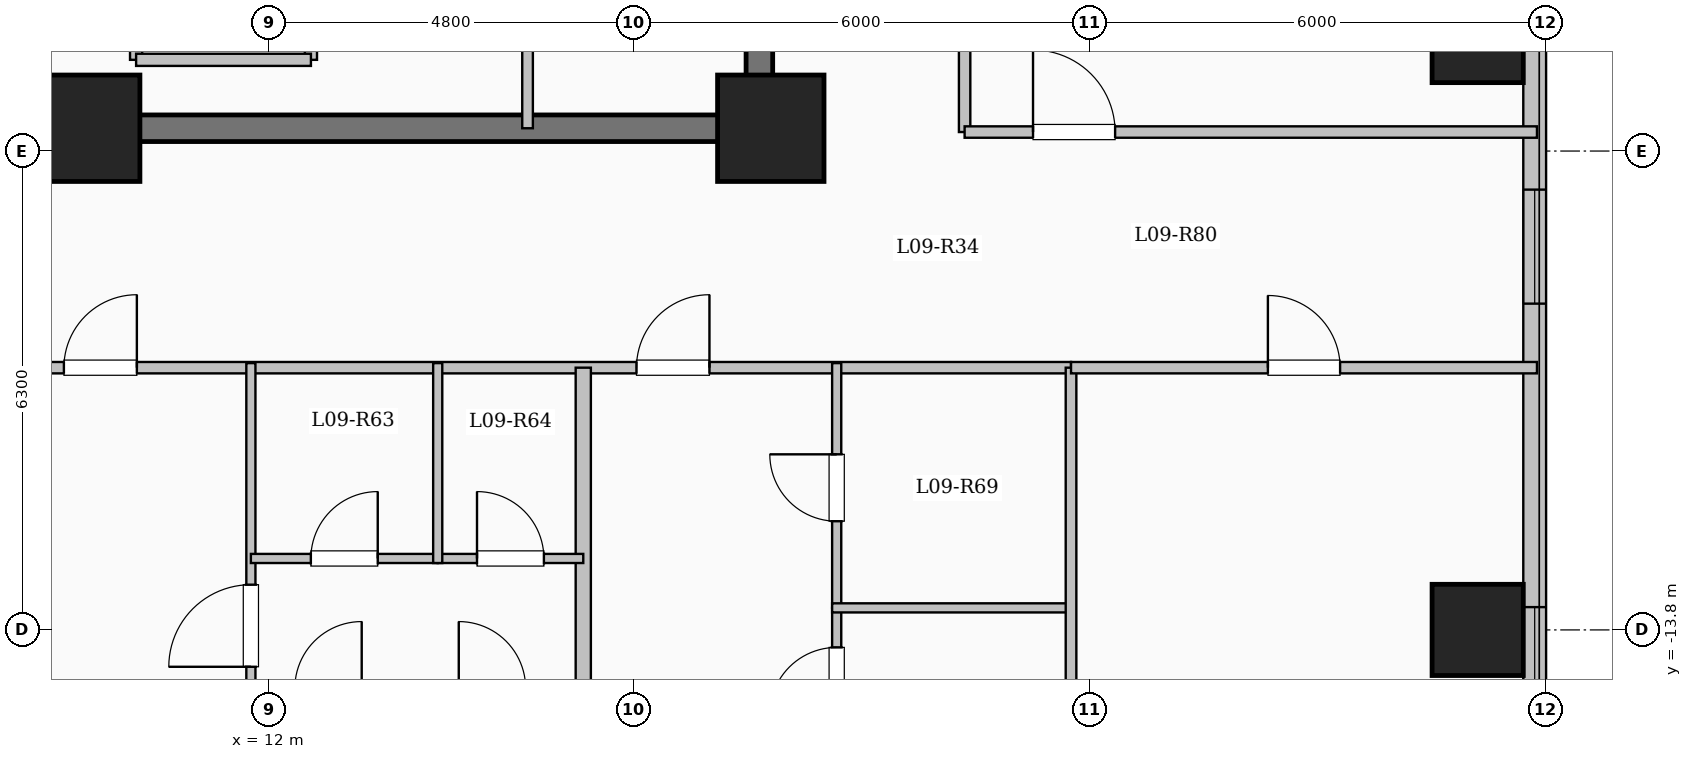
"""IFC4 building model, lengths in metres.
Left out: names, types, materials, properties, quantities, classifications, styles, units other than length and angle.
Written with IfcOpenShell. Run it as: python <this file> out.ifc"""

import sys

from ifc_helpers import new_model, si_unit, direction, frame, frame_2d, origin, origin_2d, place, context, subcontext, project, spatial, rectangle, extrude, element, fill, save


model = new_model("IFC4")
c1 = context("Model", 3, precision=1e-05, world=origin(), true_north=direction((0.0, 1.0)))
c2 = subcontext(c1, "Body", "Model", "MODEL_VIEW")
j1 = project(units=[si_unit("LENGTHUNIT", "METRE"), si_unit("PLANEANGLEUNIT", "RADIAN")], contexts=[c1])
p1 = place(None, origin())
s1 = spatial("IfcSite", under=j1, at=p1, CompositionType="ELEMENT")
p2 = place(p1, origin())
s2 = spatial("IfcBuilding", under=s1, at=p2, CompositionType="ELEMENT")
p3 = place(p2, frame((0.0, 0.0, 37.4)))
s3 = spatial("IfcBuildingStorey", under=s2, at=p3, CompositionType="ELEMENT", Elevation=37.4)
for number, where, z_axis, x_axis in (
    (1, (9.6, -7.2, 0.0), (0.0, 0.0, 1.0), (1.0, 0.0, 0.0)),
    (2, (18.6, -7.2, 0.0), (0.0, 0.0, 1.0), (1.0, 0.0, 0.0)),
):
    element("IfcColumn", number, at=place(p3, frame(where, z_axis=z_axis, x_axis=x_axis)), inside=s3, PredefinedType="COLUMN", context=c2, shape_type="SweptSolid", body=[
        extrude(rectangle(XDim=1.4, YDim=1.4, at=origin_2d()), origin(), (0.0, 0.0, 1.0), 3.35),
    ])
for number, where, z_axis, x_axis in (
    (3, (27.9, -13.8, 0.0), (0.0, 0.0, 1.0), (1.0, 0.0, 0.0)),
    (4, (27.9, -6.0, 0.0), (0.0, 0.0, 1.0), (1.0, 0.0, 0.0)),
):
    element("IfcColumn", number, at=place(p3, frame(where, z_axis=z_axis, x_axis=x_axis)), inside=s3, PredefinedType="COLUMN", context=c2, shape_type="SweptSolid", body=[
        extrude(rectangle(XDim=1.2, YDim=1.2, at=origin_2d()), origin(), (0.0, 0.0, 1.0), 3.35),
    ])
p4 = place(p3, frame((28.65, 19.05, 0.0), z_axis=(0.0, 0.0, 1.0), x_axis=(0.0, -1.0, 0.0)))
e5 = element("IfcWall", 5, at=p4, inside=s3, PredefinedType="SOLIDWALL", context=c2, shape_type="SweptSolid", body=[
    extrude(rectangle(XDim=38.1, YDim=0.3, at=frame_2d((19.05, 0.0))), origin(), (0.0, 0.0, 1.0), 3.1),
])
p5 = place(p4, frame((2.275, 0.0, 0.9)))
e6 = element("IfcOpeningElement", 6, at=p5, cuts=e5, PredefinedType="OPENING", context=c2, shape_type="SweptSolid", body=[
    extrude(rectangle(XDim=2.0, YDim=1.7, at=frame_2d((1.0, 0.85))), frame((0.0, 0.16, 0.0), z_axis=(0.0, -1.0, 0.0), x_axis=(1.0, 0.0, 0.0)), (0.0, 0.0, 1.0), 0.32),
])
p6 = place(p4, frame((6.925, 0.0, 0.95)))
e7 = element("IfcOpeningElement", 7, at=p6, cuts=e5, PredefinedType="OPENING", context=c2, shape_type="SweptSolid", body=[
    extrude(rectangle(XDim=1.0, YDim=1.5, at=frame_2d((0.5, 0.75))), frame((0.0, 0.16, 0.0), z_axis=(0.0, -1.0, 0.0), x_axis=(1.0, 0.0, 0.0)), (0.0, 0.0, 1.0), 0.32),
])
p7 = place(p4, frame((16.3, 0.0, 0.9)))
e8 = element("IfcOpeningElement", 8, at=p7, cuts=e5, PredefinedType="OPENING", context=c2, shape_type="SweptSolid", body=[
    extrude(rectangle(XDim=2.0, YDim=1.7, at=frame_2d((1.0, 0.85))), frame((0.0, 0.16, 0.0), z_axis=(0.0, -1.0, 0.0), x_axis=(1.0, 0.0, 0.0)), (0.0, 0.0, 1.0), 0.32),
])
p8 = place(p4, frame((27.058, 0.0, 0.9)))
e9 = element("IfcOpeningElement", 9, at=p8, cuts=e5, PredefinedType="OPENING", context=c2, shape_type="SweptSolid", body=[
    extrude(rectangle(XDim=1.5, YDim=1.65, at=frame_2d((0.75, 0.825))), frame((0.0, 0.16, 0.0), z_axis=(0.0, -1.0, 0.0), x_axis=(1.0, 0.0, 0.0)), (0.0, 0.0, 1.0), 0.32),
])
p9 = place(p4, frame((32.55, 0.0, 0.9)))
e10 = element("IfcOpeningElement", 10, at=p9, cuts=e5, PredefinedType="OPENING", context=c2, shape_type="SweptSolid", body=[
    extrude(rectangle(XDim=2.4, YDim=1.8, at=frame_2d((1.2, 0.9))), frame((0.0, 0.16, 0.0), z_axis=(0.0, -1.0, 0.0), x_axis=(1.0, 0.0, 0.0)), (0.0, 0.0, 1.0), 0.32),
])
for number, where, z_axis, x_axis in (
    (11, (10.25, -6.3, 0.0), (0.0, 0.0, 1.0), (0.0, 1.0, 0.0)),
    (12, (12.55, -6.3, 0.0), (0.0, 0.0, 1.0), (0.0, 1.0, 0.0)),
):
    element("IfcWall", number, at=place(p3, frame(where, z_axis=z_axis, x_axis=x_axis)), inside=s3, PredefinedType="SOLIDWALL", context=c2, shape_type="SweptSolid", body=[
        extrude(rectangle(XDim=2.6, YDim=0.16, at=frame_2d((1.3, 0.0))), origin(), (0.0, 0.0, 1.0), 3.1),
    ])
p10 = place(p3, frame((10.25, -6.3, 0.0), z_axis=(0.0, 0.0, 1.0), x_axis=(1.0, 0.0, 0.0)))
e13 = element("IfcWall", 13, at=p10, inside=s3, PredefinedType="SOLIDWALL", context=c2, shape_type="SweptSolid", body=[
    extrude(rectangle(XDim=2.3, YDim=0.16, at=frame_2d((1.15, 0.0))), origin(), (0.0, 0.0, 1.0), 3.1),
])
p11 = place(p3, frame((18.45, -7.375, 0.0), z_axis=(0.0, 0.0, 1.0), x_axis=(0.0, 1.0, 0.0)))
e14 = element("IfcWall", 14, at=p11, inside=s3, PredefinedType="SHEAR", context=c2, shape_type="SweptSolid", body=[
    extrude(rectangle(XDim=14.05, YDim=0.35, at=frame_2d((7.025, 0.0))), origin(), (0.0, 0.0, 1.0), 3.35),
])
p12 = place(p3, frame((10.075, -7.2, 0.0), z_axis=(0.0, 0.0, 1.0), x_axis=(1.0, 0.0, 0.0)))
e15 = element("IfcWall", 15, at=p12, inside=s3, PredefinedType="SHEAR", context=c2, shape_type="SweptSolid", body=[
    extrude(rectangle(XDim=8.55, YDim=0.35, at=frame_2d((4.275, 0.0))), origin(), (0.0, 0.0, 1.0), 3.35),
])
p13 = place(p3, frame((15.4, -7.2, 0.0), z_axis=(0.0, 0.0, 1.0), x_axis=(0.0, 1.0, 0.0)))
e16 = element("IfcWall", 16, at=p13, inside=s3, PredefinedType="PARTITIONING", context=c2, shape_type="SweptSolid", body=[
    extrude(rectangle(XDim=10.45, YDim=0.14, at=frame_2d((5.225, 0.0))), origin(), (0.0, 0.0, 1.0), 3.1),
])
p14 = place(p13, frame((9.25, 0.0, 0.0)))
e17 = element("IfcOpeningElement", 17, at=p14, cuts=e16, PredefinedType="OPENING", context=c2, shape_type="SweptSolid", body=[
    extrude(rectangle(XDim=0.9, YDim=2.08, at=frame_2d((0.45, 1.04))), frame((0.0, 0.08, 0.0), z_axis=(0.0, -1.0, 0.0), x_axis=(1.0, 0.0, 0.0)), (0.0, 0.0, 1.0), 0.16),
])
p15 = place(p3, frame((21.15, -7.25, 0.0), z_axis=(0.0, 0.0, 1.0), x_axis=(0.0, 1.0, 0.0)))
e18 = element("IfcWall", 18, at=p15, inside=s3, PredefinedType="PARTITIONING", context=c2, shape_type="SweptSolid", body=[
    extrude(rectangle(XDim=18.0, YDim=0.15, at=frame_2d((9.0, 0.0))), origin(), (0.0, 0.0, 1.0), 2.585),
])
p16 = place(p3, frame((8.55, -10.35, 0.0), z_axis=(0.0, 0.0, 1.0), x_axis=(1.0, 0.0, 0.0)))
e19 = element("IfcWall", 19, at=p16, inside=s3, PredefinedType="PARTITIONING", context=c2, shape_type="SweptSolid", body=[
    extrude(rectangle(XDim=14.0, YDim=0.15, at=frame_2d((7.0, 0.0))), origin(), (0.0, 0.0, 1.0), 3.1),
])
p17 = place(p16, frame((0.75, 0.0, 0.0)))
e20 = element("IfcOpeningElement", 20, at=p17, cuts=e19, PredefinedType="OPENING", context=c2, shape_type="SweptSolid", body=[
    extrude(rectangle(XDim=0.96, YDim=2.15, at=frame_2d((0.48, 1.075))), frame((0.0, 0.085, 0.0), z_axis=(0.0, -1.0, 0.0), x_axis=(1.0, 0.0, 0.0)), (0.0, 0.0, 1.0), 0.17),
])
p18 = place(p16, frame((8.283, 0.0, 0.0)))
e21 = element("IfcOpeningElement", 21, at=p18, cuts=e19, PredefinedType="OPENING", context=c2, shape_type="SweptSolid", body=[
    extrude(rectangle(XDim=0.96, YDim=2.15, at=frame_2d((0.48, 1.075))), frame((0.0, 0.085, 0.0), z_axis=(0.0, -1.0, 0.0), x_axis=(1.0, 0.0, 0.0)), (0.0, 0.0, 1.0), 0.17),
])
p19 = place(p3, frame((16.133, -23.6, 0.0), z_axis=(0.0, 0.0, 1.0), x_axis=(0.0, 1.0, 0.0)))
e22 = element("IfcWall", 22, at=p19, inside=s3, PredefinedType="SOLIDWALL", context=c2, shape_type="SweptSolid", body=[
    extrude(rectangle(XDim=13.25, YDim=0.2, at=frame_2d((6.625, 0.0))), origin(), (0.0, 0.0, 1.0), 3.1),
])
p20 = place(p3, frame((11.76, -23.6, 0.0), z_axis=(0.0, 0.0, 1.0), x_axis=(0.0, 1.0, 0.0)))
e23 = element("IfcWall", 23, at=p20, inside=s3, PredefinedType="PARTITIONING", context=c2, shape_type="SweptSolid", body=[
    extrude(rectangle(XDim=13.31, YDim=0.12, at=frame_2d((6.655, 0.0))), origin(), (0.0, 0.0, 1.0), 3.1),
])
p21 = place(p20, frame((9.315, 0.0, 0.0)))
e24 = element("IfcOpeningElement", 24, at=p21, cuts=e23, PredefinedType="OPENING", context=c2, shape_type="SweptSolid", body=[
    extrude(rectangle(XDim=1.08, YDim=2.15, at=frame_2d((0.54, 1.075))), frame((0.0, 0.07, 0.0), z_axis=(0.0, -1.0, 0.0), x_axis=(1.0, 0.0, 0.0)), (0.0, 0.0, 1.0), 0.14),
])
p22 = place(p3, frame((11.76, -12.86, 0.0), z_axis=(0.0, 0.0, 1.0), x_axis=(1.0, 0.0, 0.0)))
e25 = element("IfcWall", 25, at=p22, inside=s3, PredefinedType="PARTITIONING", context=c2, shape_type="SweptSolid", body=[
    extrude(rectangle(XDim=2.458, YDim=0.12, at=frame_2d((1.229, 0.0))), origin(), (0.0, 0.0, 1.0), 2.585),
])
p23 = place(p22, frame((0.789, 0.0, 0.0)))
e26 = element("IfcOpeningElement", 26, at=p23, cuts=e25, PredefinedType="OPENING", context=c2, shape_type="SweptSolid", body=[
    extrude(rectangle(XDim=0.88, YDim=2.1, at=frame_2d((0.44, 1.05))), frame((0.0, 0.07, 0.0), z_axis=(0.0, -1.0, 0.0), x_axis=(1.0, 0.0, 0.0)), (0.0, 0.0, 1.0), 0.14),
])
p24 = place(p3, frame((14.218, -12.86, 0.0), z_axis=(0.0, 0.0, 1.0), x_axis=(1.0, 0.0, 0.0)))
e27 = element("IfcWall", 27, at=p24, inside=s3, PredefinedType="PARTITIONING", context=c2, shape_type="SweptSolid", body=[
    extrude(rectangle(XDim=1.915, YDim=0.12, at=frame_2d((0.958, 0.0))), origin(), (0.0, 0.0, 1.0), 2.585),
])
p25 = place(p24, frame((0.517, 0.0, 0.0)))
e28 = element("IfcOpeningElement", 28, at=p25, cuts=e27, PredefinedType="OPENING", context=c2, shape_type="SweptSolid", body=[
    extrude(rectangle(XDim=0.88, YDim=2.1, at=frame_2d((0.44, 1.05))), frame((0.0, 0.07, 0.0), z_axis=(0.0, -1.0, 0.0), x_axis=(1.0, 0.0, 0.0)), (0.0, 0.0, 1.0), 0.14),
])
p26 = place(p3, frame((14.218, -12.92, 0.0), z_axis=(0.0, 0.0, 1.0), x_axis=(0.0, 1.0, 0.0)))
e29 = element("IfcWall", 29, at=p26, inside=s3, PredefinedType="PARTITIONING", context=c2, shape_type="SweptSolid", body=[
    extrude(rectangle(XDim=2.63, YDim=0.12, at=frame_2d((1.315, 0.0))), origin(), (0.0, 0.0, 1.0), 3.1),
])
p27 = place(p3, frame((19.467, -23.6, 0.0), z_axis=(0.0, 0.0, 1.0), x_axis=(0.0, 1.0, 0.0)))
e30 = element("IfcWall", 30, at=p27, inside=s3, PredefinedType="PARTITIONING", context=c2, shape_type="SweptSolid", body=[
    extrude(rectangle(XDim=10.09, YDim=0.12, at=frame_2d((5.045, 0.0))), origin(), (0.0, 0.0, 1.0), 3.1),
])
p28 = place(p27, frame((8.69, 0.0, 0.0)))
e31 = element("IfcOpeningElement", 31, at=p28, cuts=e30, PredefinedType="OPENING", context=c2, shape_type="SweptSolid", body=[
    extrude(rectangle(XDim=0.88, YDim=2.1, at=frame_2d((0.44, 1.05))), frame((0.0, 0.07, 0.0), z_axis=(0.0, -1.0, 0.0), x_axis=(1.0, 0.0, 0.0)), (0.0, 0.0, 1.0), 0.14),
])
p29 = place(p3, frame((19.467, -13.51, 0.0), z_axis=(0.0, 0.0, 1.0), x_axis=(0.0, 1.0, 0.0)))
e32 = element("IfcWall", 32, at=p29, inside=s3, PredefinedType="PARTITIONING", context=c2, shape_type="SweptSolid", body=[
    extrude(rectangle(XDim=3.22, YDim=0.12, at=frame_2d((1.61, 0.0))), origin(), (0.0, 0.0, 1.0), 3.1),
])
p30 = place(p29, frame((1.14, 0.0, 0.0)))
e33 = element("IfcOpeningElement", 33, at=p30, cuts=e32, PredefinedType="OPENING", context=c2, shape_type="SweptSolid", body=[
    extrude(rectangle(XDim=0.88, YDim=2.1, at=frame_2d((0.44, 1.05))), frame((0.0, 0.07, 0.0), z_axis=(0.0, -1.0, 0.0), x_axis=(1.0, 0.0, 0.0)), (0.0, 0.0, 1.0), 0.14),
])
p31 = place(p3, frame((19.407, -13.51, 0.0), z_axis=(0.0, 0.0, 1.0), x_axis=(1.0, 0.0, 0.0)))
e34 = element("IfcWall", 34, at=p31, inside=s3, PredefinedType="PARTITIONING", context=c2, shape_type="SweptSolid", body=[
    extrude(rectangle(XDim=3.203, YDim=0.12, at=frame_2d((1.602, 0.0))), origin(), (0.0, 0.0, 1.0), 3.1),
])
p32 = place(p3, frame((21.15, -7.25, 0.0), z_axis=(0.0, 0.0, 1.0), x_axis=(1.0, 0.0, 0.0)))
e35 = element("IfcWall", 35, at=p32, inside=s3, PredefinedType="PARTITIONING", context=c2, shape_type="SweptSolid", body=[
    extrude(rectangle(XDim=7.53, YDim=0.15, at=frame_2d((3.765, 0.0))), origin(), (0.0, 0.0, 1.0), 3.1),
])
p33 = place(p32, frame((0.9, 0.0, 0.0)))
e36 = element("IfcOpeningElement", 36, at=p33, cuts=e35, PredefinedType="OPENING", context=c2, shape_type="SweptSolid", body=[
    extrude(rectangle(XDim=1.08, YDim=2.15, at=frame_2d((0.54, 1.075))), frame((0.0, 0.085, 0.0), z_axis=(0.0, -1.0, 0.0), x_axis=(1.0, 0.0, 0.0)), (0.0, 0.0, 1.0), 0.17),
])
p34 = place(p3, frame((22.55, -19.05, 0.0), z_axis=(0.0, 0.0, 1.0), x_axis=(0.0, 1.0, 0.0)))
e37 = element("IfcWall", 37, at=p34, inside=s3, PredefinedType="PARTITIONING", context=c2, shape_type="SweptSolid", body=[
    extrude(rectangle(XDim=8.7, YDim=0.14, at=frame_2d((4.35, 0.0))), origin(), (0.0, 0.0, 1.0), 3.1),
])
p35 = place(p3, frame((22.55, -10.35, 0.0), z_axis=(0.0, 0.0, 1.0), x_axis=(1.0, 0.0, 0.0)))
e38 = element("IfcWall", 38, at=p35, inside=s3, PredefinedType="PARTITIONING", context=c2, shape_type="SweptSolid", body=[
    extrude(rectangle(XDim=6.13, YDim=0.15, at=frame_2d((3.065, 0.0))), origin(), (0.0, 0.0, 1.0), 3.1),
])
p36 = place(p35, frame((2.59, 0.0, 0.0)))
e39 = element("IfcOpeningElement", 39, at=p36, cuts=e38, PredefinedType="OPENING", context=c2, shape_type="SweptSolid", body=[
    extrude(rectangle(XDim=0.95, YDim=2.15, at=frame_2d((0.475, 1.075))), frame((0.0, 0.085, 0.0), z_axis=(0.0, -1.0, 0.0), x_axis=(1.0, 0.0, 0.0)), (0.0, 0.0, 1.0), 0.17),
])
p37 = place(p8, origin())
e40 = element("IfcWindow", 40, at=p37, inside=s3, PartitioningType="SINGLE_PANEL", PredefinedType="WINDOW", context=c2, shape_type="SweptSolid", body=[
    extrude(rectangle(XDim=1.5, YDim=1.65, at=frame_2d((0.75, 0.825))), frame((0.0, 0.03, 0.0), z_axis=(0.0, -1.0, 0.0), x_axis=(1.0, 0.0, 0.0)), (0.0, 0.0, 1.0), 0.06),
])
fill(e9, e40)
p38 = place(p9, origin())
e41 = element("IfcWindow", 41, at=p38, inside=s3, PartitioningType="SINGLE_PANEL", PredefinedType="WINDOW", context=c2, shape_type="SweptSolid", body=[
    extrude(rectangle(XDim=2.4, YDim=1.8, at=frame_2d((1.2, 0.9))), frame((0.0, 0.03, 0.0), z_axis=(0.0, -1.0, 0.0), x_axis=(1.0, 0.0, 0.0)), (0.0, 0.0, 1.0), 0.06),
])
fill(e10, e41)
p39 = place(p17, origin())
e42 = element("IfcDoor", 42, at=p39, inside=s3, OperationType="SINGLE_SWING_RIGHT", PredefinedType="DOOR", context=c2, shape_type="SweptSolid", body=[
    extrude(rectangle(XDim=0.96, YDim=2.15, at=frame_2d((0.48, 1.075))), frame((0.0, 0.025, 0.0), z_axis=(0.0, -1.0, 0.0), x_axis=(1.0, 0.0, 0.0)), (0.0, 0.0, 1.0), 0.05),
])
fill(e20, e42)
p40 = place(p21, origin())
e43 = element("IfcDoor", 43, at=p40, inside=s3, OperationType="SINGLE_SWING_LEFT", PredefinedType="DOOR", context=c2, shape_type="SweptSolid", body=[
    extrude(rectangle(XDim=1.08, YDim=2.15, at=frame_2d((0.54, 1.075))), frame((0.0, 0.025, 0.0), z_axis=(0.0, -1.0, 0.0), x_axis=(1.0, 0.0, 0.0)), (0.0, 0.0, 1.0), 0.05),
])
fill(e24, e43)
p41 = place(p23, origin())
e44 = element("IfcDoor", 44, at=p41, inside=s3, OperationType="SINGLE_SWING_RIGHT", PredefinedType="DOOR", context=c2, shape_type="SweptSolid", body=[
    extrude(rectangle(XDim=0.88, YDim=2.1, at=frame_2d((0.44, 1.05))), frame((0.0, 0.025, 0.0), z_axis=(0.0, -1.0, 0.0), x_axis=(1.0, 0.0, 0.0)), (0.0, 0.0, 1.0), 0.05),
])
fill(e26, e44)
p42 = place(p25, origin())
e45 = element("IfcDoor", 45, at=p42, inside=s3, OperationType="SINGLE_SWING_LEFT", PredefinedType="DOOR", context=c2, shape_type="SweptSolid", body=[
    extrude(rectangle(XDim=0.88, YDim=2.1, at=frame_2d((0.44, 1.05))), frame((0.0, 0.025, 0.0), z_axis=(0.0, -1.0, 0.0), x_axis=(1.0, 0.0, 0.0)), (0.0, 0.0, 1.0), 0.05),
])
fill(e28, e45)
p43 = place(p18, origin())
e46 = element("IfcDoor", 46, at=p43, inside=s3, OperationType="SINGLE_SWING_RIGHT", PredefinedType="DOOR", context=c2, shape_type="SweptSolid", body=[
    extrude(rectangle(XDim=0.96, YDim=2.15, at=frame_2d((0.48, 1.075))), frame((0.0, 0.025, 0.0), z_axis=(0.0, -1.0, 0.0), x_axis=(1.0, 0.0, 0.0)), (0.0, 0.0, 1.0), 0.05),
])
fill(e21, e46)
p44 = place(p28, origin())
e47 = element("IfcDoor", 47, at=p44, inside=s3, OperationType="SINGLE_SWING_LEFT", PredefinedType="DOOR", context=c2, shape_type="SweptSolid", body=[
    extrude(rectangle(XDim=0.88, YDim=2.1, at=frame_2d((0.44, 1.05))), frame((0.0, 0.025, 0.0), z_axis=(0.0, -1.0, 0.0), x_axis=(1.0, 0.0, 0.0)), (0.0, 0.0, 1.0), 0.05),
])
fill(e31, e47)
p45 = place(p30, origin())
e48 = element("IfcDoor", 48, at=p45, inside=s3, OperationType="SINGLE_SWING_RIGHT", PredefinedType="DOOR", context=c2, shape_type="SweptSolid", body=[
    extrude(rectangle(XDim=0.88, YDim=2.1, at=frame_2d((0.44, 1.05))), frame((0.0, 0.025, 0.0), z_axis=(0.0, -1.0, 0.0), x_axis=(1.0, 0.0, 0.0)), (0.0, 0.0, 1.0), 0.05),
])
fill(e33, e48)
p46 = place(p36, origin())
e49 = element("IfcDoor", 49, at=p46, inside=s3, OperationType="SINGLE_SWING_LEFT", PredefinedType="DOOR", context=c2, shape_type="SweptSolid", body=[
    extrude(rectangle(XDim=0.95, YDim=2.15, at=frame_2d((0.475, 1.075))), frame((0.0, 0.025, 0.0), z_axis=(0.0, -1.0, 0.0), x_axis=(1.0, 0.0, 0.0)), (0.0, 0.0, 1.0), 0.05),
])
fill(e39, e49)
p47 = place(p33, origin())
e50 = element("IfcDoor", 50, at=p47, inside=s3, OperationType="SINGLE_SWING_LEFT", PredefinedType="DOOR", context=c2, shape_type="SweptSolid", body=[
    extrude(rectangle(XDim=1.08, YDim=2.15, at=frame_2d((0.54, 1.075))), frame((0.0, 0.025, 0.0), z_axis=(0.0, -1.0, 0.0), x_axis=(1.0, 0.0, 0.0)), (0.0, 0.0, 1.0), 0.05),
])
fill(e36, e50)
save(model, sys.argv[1])
